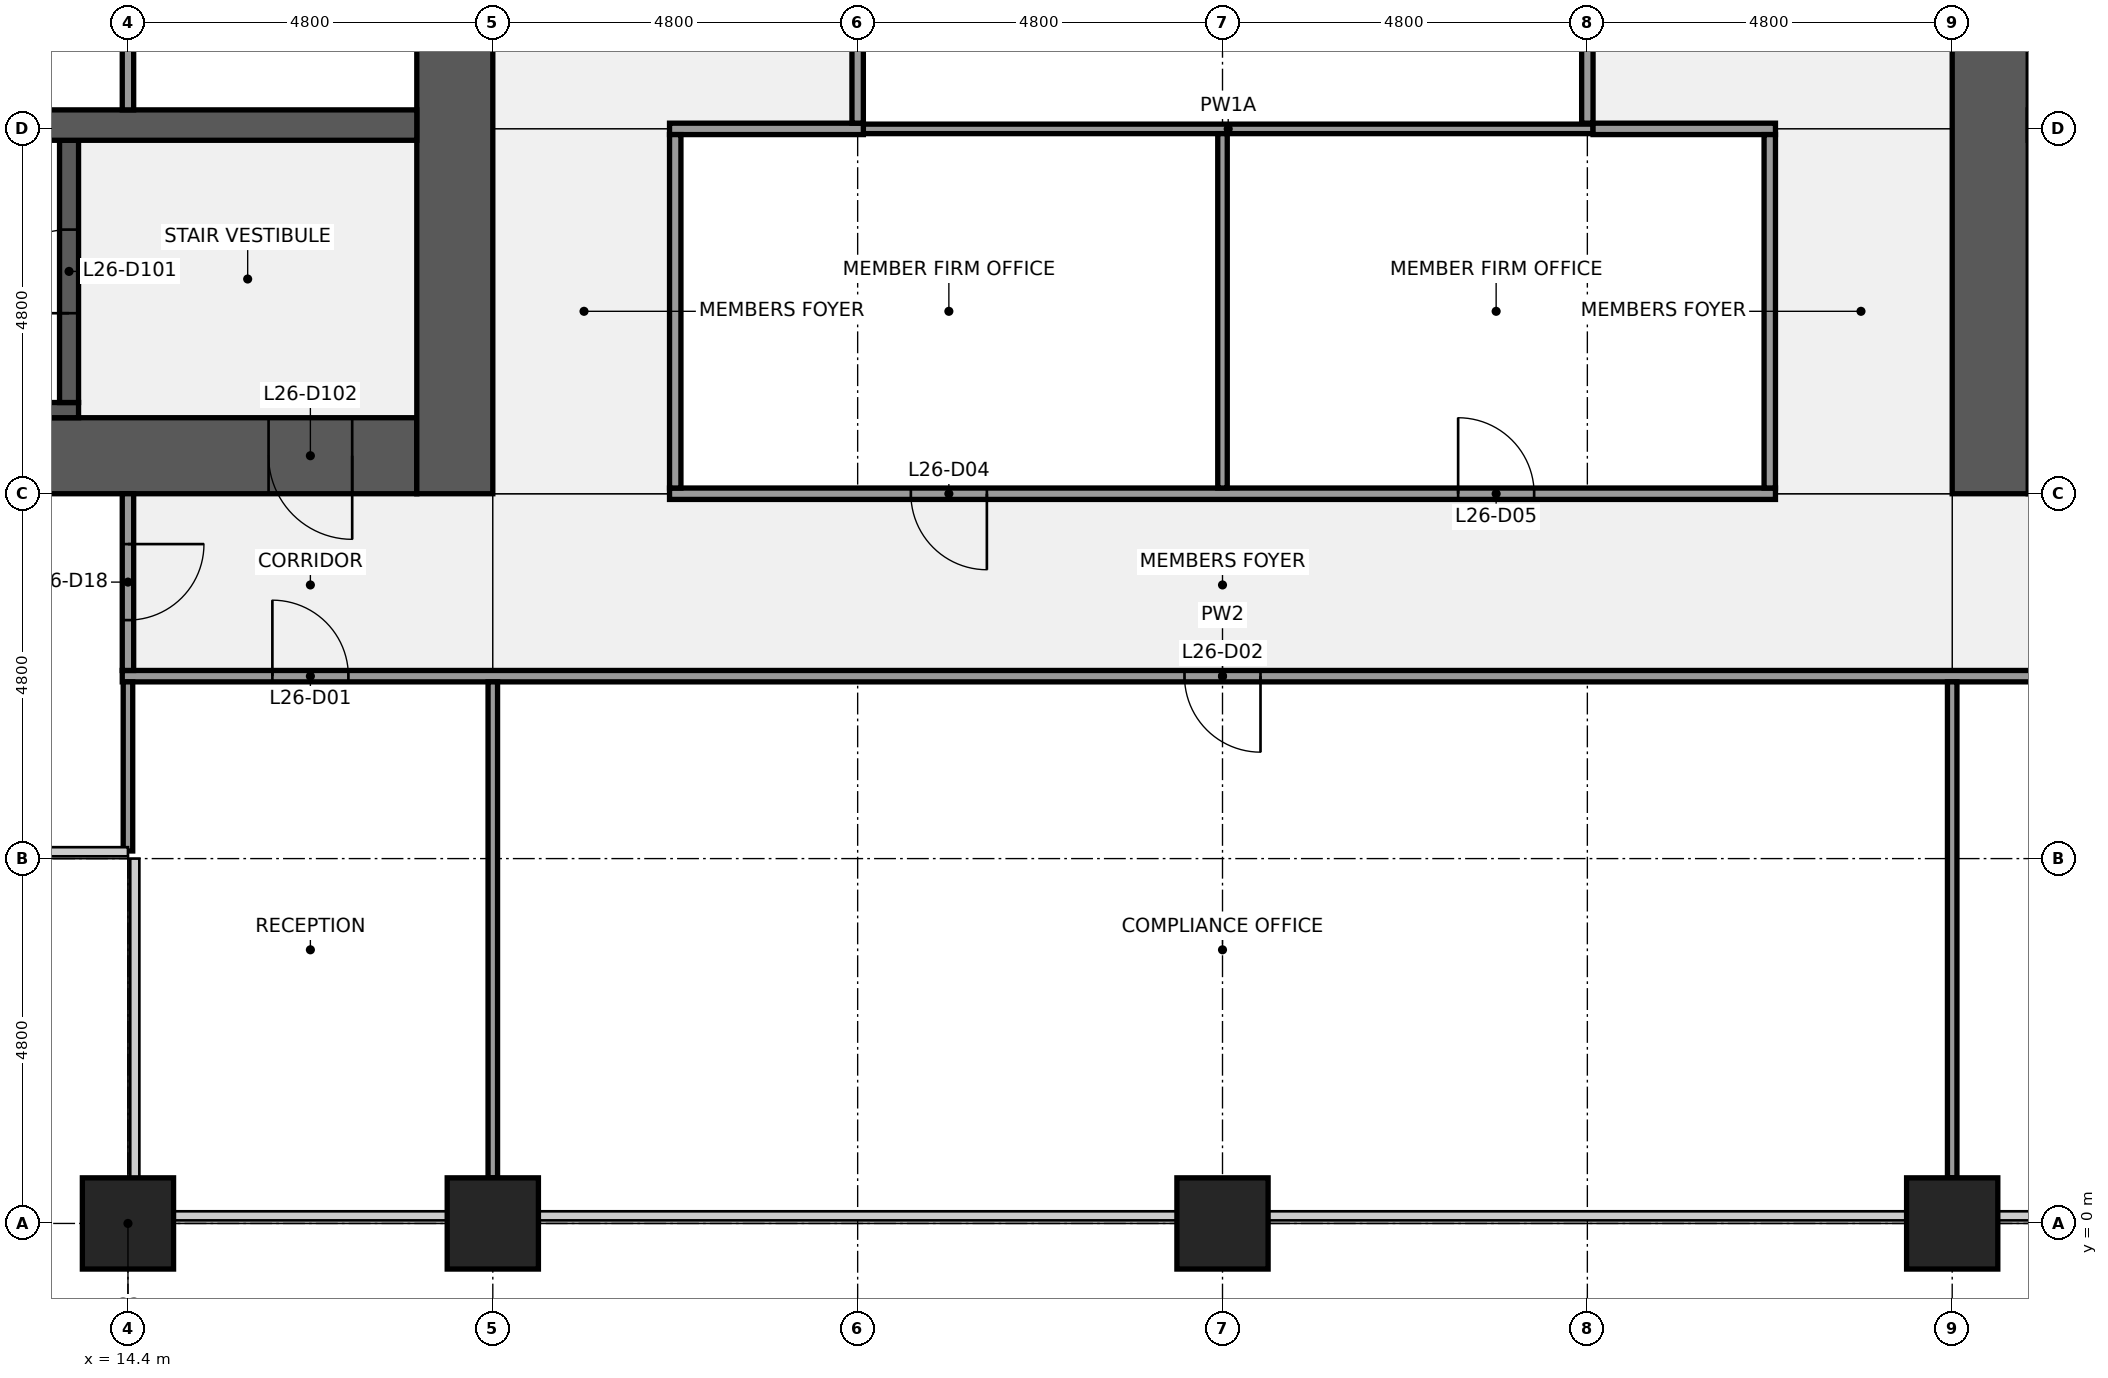
"""IFC4 building model, lengths in metres.
Left out: names, types, materials, properties, quantities, classifications, styles, units other than length and angle.
Written with IfcOpenShell. Run it as: python <this file> out.ifc"""

import sys

from ifc_helpers import new_model, si_unit, direction, frame, frame_2d, origin, origin_2d, place, context, subcontext, project, spatial, rectangle, extrude, element, fill, save


model = new_model("IFC4")
c1 = context("Model", 3, precision=1e-05, world=origin(), true_north=direction((0.0, 1.0)))
c2 = subcontext(c1, "Body", "Model", "MODEL_VIEW")
j1 = project(units=[si_unit("LENGTHUNIT", "METRE"), si_unit("PLANEANGLEUNIT", "RADIAN")], contexts=[c1])
p1 = place(None, origin())
s1 = spatial("IfcSite", under=j1, at=p1, CompositionType="ELEMENT")
p2 = place(p1, origin())
s2 = spatial("IfcBuilding", under=s1, at=p2, CompositionType="ELEMENT")
p3 = place(p2, frame((0.0, 0.0, 124.1)))
s3 = spatial("IfcBuildingStorey", under=s2, at=p3, CompositionType="ELEMENT", Elevation=124.1)
for number, where, z_axis, x_axis in (
    (1, (14.4, 0.0, 0.0), (0.0, 0.0, 1.0), (1.0, 0.0, 0.0)),
    (2, (19.2, 0.0, 0.0), (0.0, 0.0, 1.0), (1.0, 0.0, 0.0)),
    (3, (28.8, 0.0, 0.0), (0.0, 0.0, 1.0), (1.0, 0.0, 0.0)),
    (4, (38.4, 0.0, 0.0), (0.0, 0.0, 1.0), (1.0, 0.0, 0.0)),
):
    element("IfcColumn", number, at=place(p3, frame(where, z_axis=z_axis, x_axis=x_axis)), inside=s3, PredefinedType="COLUMN", context=c2, shape_type="SweptSolid", body=[
        extrude(rectangle(XDim=1.2, YDim=1.2, at=origin_2d()), origin(), (0.0, 0.0, 1.0), 4.0),
    ])
p4 = place(p3, frame((18.2, 10.1, 0.0), z_axis=(0.0, 0.0, 1.0), x_axis=(-1.0, 0.0, 0.0)))
e5 = element("IfcWall", 5, at=p4, inside=s3, PredefinedType="SHEAR", context=c2, shape_type="SweptSolid", body=[
    extrude(rectangle(XDim=8.6, YDim=1.0, at=frame_2d((4.3, 0.0))), origin(), (0.0, 0.0, 1.0), 3.84),
])
p5 = place(p4, frame((0.85, 0.0, 0.0)))
e6 = element("IfcOpeningElement", 6, at=p5, cuts=e5, PredefinedType="OPENING", context=c2, shape_type="SweptSolid", body=[
    extrude(rectangle(XDim=1.1, YDim=2.1, at=frame_2d((0.55, 1.05))), frame((0.0, 0.51, 0.0), z_axis=(0.0, -1.0, 0.0), x_axis=(1.0, 0.0, 0.0)), (0.0, 0.0, 1.0), 1.02),
])
p6 = place(p3, frame((18.7, 38.4, 0.0), z_axis=(0.0, 0.0, 1.0), x_axis=(0.0, -1.0, 0.0)))
e7 = element("IfcWall", 7, at=p6, inside=s3, PredefinedType="SHEAR", context=c2, shape_type="SweptSolid", body=[
    extrude(rectangle(XDim=28.8, YDim=1.0, at=frame_2d((14.4, 0.0))), origin(), (0.0, 0.0, 1.0), 3.84),
])
p7 = place(p6, frame((18.3, 0.0, 0.0)))
e8 = element("IfcOpeningElement", 8, at=p7, cuts=e7, PredefinedType="OPENING", context=c2, shape_type="SweptSolid", body=[
    extrude(rectangle(XDim=1.8, YDim=2.1, at=frame_2d((0.9, 1.05))), frame((0.0, 0.51, 0.0), z_axis=(0.0, -1.0, 0.0), x_axis=(1.0, 0.0, 0.0)), (0.0, 0.0, 1.0), 1.02),
])
p8 = place(p6, frame((8.7, 0.0, 0.0)))
e9 = element("IfcOpeningElement", 9, at=p8, cuts=e7, PredefinedType="OPENING", context=c2, shape_type="SweptSolid", body=[
    extrude(rectangle(XDim=1.8, YDim=2.1, at=frame_2d((0.9, 1.05))), frame((0.0, 0.51, 0.0), z_axis=(0.0, -1.0, 0.0), x_axis=(1.0, 0.0, 0.0)), (0.0, 0.0, 1.0), 1.02),
])
p9 = place(p3, frame((9.6, 10.7, 0.0), z_axis=(0.0, 0.0, 1.0), x_axis=(1.0, 0.0, 0.0)))
e10 = element("IfcWall", 10, at=p9, inside=s3, PredefinedType="SHEAR", context=c2, shape_type="SweptSolid", body=[
    extrude(rectangle(XDim=4.15, YDim=0.2, at=frame_2d((2.075, 0.0))), origin(), (0.0, 0.0, 1.0), 3.84),
])
p10 = place(p3, frame((13.625, 10.8, 0.0), z_axis=(0.0, 0.0, 1.0), x_axis=(0.0, 1.0, 0.0)))
e11 = element("IfcWall", 11, at=p10, inside=s3, PredefinedType="SHEAR", context=c2, shape_type="SweptSolid", body=[
    extrude(rectangle(XDim=3.45, YDim=0.25, at=frame_2d((1.725, 0.0))), origin(), (0.0, 0.0, 1.0), 3.84),
])
p11 = place(p10, frame((1.175, 0.0, 0.0)))
e12 = element("IfcOpeningElement", 12, at=p11, cuts=e11, PredefinedType="OPENING", context=c2, shape_type="SweptSolid", body=[
    extrude(rectangle(XDim=1.1, YDim=2.1, at=frame_2d((0.55, 1.05))), frame((0.0, 0.135, 0.0), z_axis=(0.0, -1.0, 0.0), x_axis=(1.0, 0.0, 0.0)), (0.0, 0.0, 1.0), 0.27),
])
p12 = place(p3, frame((1.0, 14.45, 0.0), z_axis=(0.0, 0.0, 1.0), x_axis=(1.0, 0.0, 0.0)))
e13 = element("IfcWall", 13, at=p12, inside=s3, PredefinedType="SHEAR", context=c2, shape_type="SweptSolid", body=[
    extrude(rectangle(XDim=17.2, YDim=0.4, at=frame_2d((8.6, 0.0))), origin(), (0.0, 0.0, 1.0), 3.84),
])
p13 = place(p3, frame((14.4, 14.65, 0.0), z_axis=(0.0, 0.0, 1.0), x_axis=(0.0, 1.0, 0.0)))
e14 = element("IfcWall", 14, at=p13, inside=s3, PredefinedType="PARTITIONING", context=c2, shape_type="SweptSolid", body=[
    extrude(rectangle(XDim=2.6, YDim=0.15, at=frame_2d((1.3, 0.0))), origin(), (0.0, 0.0, 1.0), 3.84),
])
p14 = place(p3, frame((38.9, 9.6, 0.0), z_axis=(0.0, 0.0, 1.0), x_axis=(0.0, 1.0, 0.0)))
e15 = element("IfcWall", 15, at=p14, inside=s3, PredefinedType="SHEAR", context=c2, shape_type="SweptSolid", body=[
    extrude(rectangle(XDim=28.8, YDim=1.0, at=frame_2d((14.4, 0.0))), origin(), (0.0, 0.0, 1.0), 3.84),
])
p15 = place(p14, frame((8.7, 0.0, 0.0)))
e16 = element("IfcOpeningElement", 16, at=p15, cuts=e15, PredefinedType="OPENING", context=c2, shape_type="SweptSolid", body=[
    extrude(rectangle(XDim=1.8, YDim=2.1, at=frame_2d((0.9, 1.05))), frame((0.0, 0.51, 0.0), z_axis=(0.0, -1.0, 0.0), x_axis=(1.0, 0.0, 0.0)), (0.0, 0.0, 1.0), 1.02),
])
p16 = place(p14, frame((18.3, 0.0, 0.0)))
e17 = element("IfcOpeningElement", 17, at=p16, cuts=e15, PredefinedType="OPENING", context=c2, shape_type="SweptSolid", body=[
    extrude(rectangle(XDim=1.8, YDim=2.1, at=frame_2d((0.9, 1.05))), frame((0.0, 0.51, 0.0), z_axis=(0.0, -1.0, 0.0), x_axis=(1.0, 0.0, 0.0)), (0.0, 0.0, 1.0), 1.02),
])
p17 = place(p3, frame((14.325, 7.2, 0.0), z_axis=(0.0, 0.0, 1.0), x_axis=(1.0, 0.0, 0.0)))
e18 = element("IfcWall", 18, at=p17, inside=s3, PredefinedType="PARTITIONING", context=c2, shape_type="SweptSolid", body=[
    extrude(rectangle(XDim=28.95, YDim=0.15, at=frame_2d((14.475, 0.0))), origin(), (0.0, 0.0, 1.0), 2.849),
])
p18 = place(p17, frame((1.975, 0.0, 0.0)))
e19 = element("IfcOpeningElement", 19, at=p18, cuts=e18, PredefinedType="OPENING", context=c2, shape_type="SweptSolid", body=[
    extrude(rectangle(XDim=1.0, YDim=2.1, at=frame_2d((0.5, 1.05))), frame((0.0, 0.085, 0.0), z_axis=(0.0, -1.0, 0.0), x_axis=(1.0, 0.0, 0.0)), (0.0, 0.0, 1.0), 0.17),
])
p19 = place(p17, frame((13.975, 0.0, 0.0)))
e20 = element("IfcOpeningElement", 20, at=p19, cuts=e18, PredefinedType="OPENING", context=c2, shape_type="SweptSolid", body=[
    extrude(rectangle(XDim=1.0, YDim=2.1, at=frame_2d((0.5, 1.05))), frame((0.0, 0.085, 0.0), z_axis=(0.0, -1.0, 0.0), x_axis=(1.0, 0.0, 0.0)), (0.0, 0.0, 1.0), 0.17),
])
p20 = place(p17, frame((25.975, 0.0, 0.0)))
e21 = element("IfcOpeningElement", 21, at=p20, cuts=e18, PredefinedType="OPENING", context=c2, shape_type="SweptSolid", body=[
    extrude(rectangle(XDim=1.0, YDim=2.1, at=frame_2d((0.5, 1.05))), frame((0.0, 0.085, 0.0), z_axis=(0.0, -1.0, 0.0), x_axis=(1.0, 0.0, 0.0)), (0.0, 0.0, 1.0), 0.17),
])
p21 = place(p3, frame((21.525, 9.6, 0.0), z_axis=(0.0, 0.0, 1.0), x_axis=(1.0, 0.0, 0.0)))
e22 = element("IfcWall", 22, at=p21, inside=s3, PredefinedType="PARTITIONING", context=c2, shape_type="SweptSolid", body=[
    extrude(rectangle(XDim=14.55, YDim=0.15, at=frame_2d((7.275, 0.0))), origin(), (0.0, 0.0, 1.0), 2.849),
])
p22 = place(p21, frame((3.175, 0.0, 0.0)))
e23 = element("IfcOpeningElement", 23, at=p22, cuts=e22, PredefinedType="OPENING", context=c2, shape_type="SweptSolid", body=[
    extrude(rectangle(XDim=1.0, YDim=2.1, at=frame_2d((0.5, 1.05))), frame((0.0, 0.085, 0.0), z_axis=(0.0, -1.0, 0.0), x_axis=(1.0, 0.0, 0.0)), (0.0, 0.0, 1.0), 0.17),
])
p23 = place(p21, frame((10.375, 0.0, 0.0)))
e24 = element("IfcOpeningElement", 24, at=p23, cuts=e22, PredefinedType="OPENING", context=c2, shape_type="SweptSolid", body=[
    extrude(rectangle(XDim=1.0, YDim=2.1, at=frame_2d((0.5, 1.05))), frame((0.0, 0.085, 0.0), z_axis=(0.0, -1.0, 0.0), x_axis=(1.0, 0.0, 0.0)), (0.0, 0.0, 1.0), 0.17),
])
p24 = place(p3, frame((24.075, 14.4, 0.0), z_axis=(0.0, 0.0, 1.0), x_axis=(1.0, 0.0, 0.0)))
e25 = element("IfcWall", 25, at=p24, inside=s3, PredefinedType="PARTITIONING", context=c2, shape_type="SweptSolid", body=[
    extrude(rectangle(XDim=9.6, YDim=0.125, at=frame_2d((4.8, 0.0))), origin(), (0.0, 0.0, 1.0), 2.849),
])
p25 = place(p3, frame((21.525, 14.4, 0.0), z_axis=(0.0, 0.0, 1.0), x_axis=(1.0, 0.0, 0.0)))
e26 = element("IfcWall", 26, at=p25, inside=s3, PredefinedType="PARTITIONING", context=c2, shape_type="SweptSolid", body=[
    extrude(rectangle(XDim=2.55, YDim=0.15, at=frame_2d((1.275, 0.0))), origin(), (0.0, 0.0, 1.0), 2.849),
])
p26 = place(p3, frame((33.675, 14.4, 0.0), z_axis=(0.0, 0.0, 1.0), x_axis=(1.0, 0.0, 0.0)))
e27 = element("IfcWall", 27, at=p26, inside=s3, PredefinedType="PARTITIONING", context=c2, shape_type="SweptSolid", body=[
    extrude(rectangle(XDim=2.4, YDim=0.15, at=frame_2d((1.2, 0.0))), origin(), (0.0, 0.0, 1.0), 2.849),
])
p27 = place(p3, frame((14.4, 4.9, 0.0), z_axis=(0.0, 0.0, 1.0), x_axis=(0.0, 1.0, 0.0)))
e28 = element("IfcWall", 28, at=p27, inside=s3, PredefinedType="PARTITIONING", context=c2, shape_type="SweptSolid", body=[
    extrude(rectangle(XDim=2.225, YDim=0.125, at=frame_2d((1.113, 0.0))), origin(), (0.0, 0.0, 1.0), 2.849),
])
p28 = place(p3, frame((14.4, 7.275, 0.0), z_axis=(0.0, 0.0, 1.0), x_axis=(0.0, 1.0, 0.0)))
e29 = element("IfcWall", 29, at=p28, inside=s3, PredefinedType="PARTITIONING", context=c2, shape_type="SweptSolid", body=[
    extrude(rectangle(XDim=2.325, YDim=0.15, at=frame_2d((1.163, 0.0))), origin(), (0.0, 0.0, 1.0), 2.849),
])
p29 = place(p28, frame((0.663, 0.0, 0.0)))
e30 = element("IfcOpeningElement", 30, at=p29, cuts=e29, PredefinedType="OPENING", context=c2, shape_type="SweptSolid", body=[
    extrude(rectangle(XDim=1.0, YDim=2.1, at=frame_2d((0.5, 1.05))), frame((0.0, 0.085, 0.0), z_axis=(0.0, -1.0, 0.0), x_axis=(1.0, 0.0, 0.0)), (0.0, 0.0, 1.0), 0.17),
])
p30 = place(p3, frame((19.2, 0.6, 0.0), z_axis=(0.0, 0.0, 1.0), x_axis=(0.0, 1.0, 0.0)))
e31 = element("IfcWall", 31, at=p30, inside=s3, PredefinedType="PARTITIONING", context=c2, shape_type="SweptSolid", body=[
    extrude(rectangle(XDim=6.525, YDim=0.125, at=frame_2d((3.262, 0.0))), origin(), (0.0, 0.0, 1.0), 2.849),
])
p31 = place(p3, frame((21.6, 9.675, 0.0), z_axis=(0.0, 0.0, 1.0), x_axis=(0.0, 1.0, 0.0)))
e32 = element("IfcWall", 32, at=p31, inside=s3, PredefinedType="PARTITIONING", context=c2, shape_type="SweptSolid", body=[
    extrude(rectangle(XDim=4.65, YDim=0.15, at=frame_2d((2.325, 0.0))), origin(), (0.0, 0.0, 1.0), 2.849),
])
p32 = place(p3, frame((24.0, 14.475, 0.0), z_axis=(0.0, 0.0, 1.0), x_axis=(0.0, 1.0, 0.0)))
e33 = element("IfcWall", 33, at=p32, inside=s3, PredefinedType="PARTITIONING", context=c2, shape_type="SweptSolid", body=[
    extrude(rectangle(XDim=8.25, YDim=0.15, at=frame_2d((4.125, 0.0))), origin(), (0.0, 0.0, 1.0), 2.849),
])
p33 = place(p3, frame((28.8, 9.675, 0.0), z_axis=(0.0, 0.0, 1.0), x_axis=(0.0, 1.0, 0.0)))
e34 = element("IfcWall", 34, at=p33, inside=s3, PredefinedType="PARTITIONING", context=c2, shape_type="SweptSolid", body=[
    extrude(rectangle(XDim=4.662, YDim=0.125, at=frame_2d((2.331, 0.0))), origin(), (0.0, 0.0, 1.0), 2.849),
])
p34 = place(p3, frame((33.6, 14.475, 0.0), z_axis=(0.0, 0.0, 1.0), x_axis=(0.0, 1.0, 0.0)))
e35 = element("IfcWall", 35, at=p34, inside=s3, PredefinedType="PARTITIONING", context=c2, shape_type="SweptSolid", body=[
    extrude(rectangle(XDim=8.25, YDim=0.15, at=frame_2d((4.125, 0.0))), origin(), (0.0, 0.0, 1.0), 2.849),
])
p35 = place(p3, frame((36.0, 9.675, 0.0), z_axis=(0.0, 0.0, 1.0), x_axis=(0.0, 1.0, 0.0)))
e36 = element("IfcWall", 36, at=p35, inside=s3, PredefinedType="PARTITIONING", context=c2, shape_type="SweptSolid", body=[
    extrude(rectangle(XDim=4.65, YDim=0.15, at=frame_2d((2.325, 0.0))), origin(), (0.0, 0.0, 1.0), 2.849),
])
p36 = place(p3, frame((38.4, 0.6, 0.0), z_axis=(0.0, 0.0, 1.0), x_axis=(0.0, 1.0, 0.0)))
e37 = element("IfcWall", 37, at=p36, inside=s3, PredefinedType="PARTITIONING", context=c2, shape_type="SweptSolid", body=[
    extrude(rectangle(XDim=6.525, YDim=0.125, at=frame_2d((3.262, 0.0))), origin(), (0.0, 0.0, 1.0), 2.849),
])
for number, where, z_axis, x_axis in (
    (38, (14.4, -1.05, 0.0), (0.0, 0.0, 1.0), (1.0, 0.0, 0.0)),
    (39, (19.2, -1.05, 0.0), (0.0, 0.0, 1.0), (1.0, 0.0, 0.0)),
    (40, (38.4, -1.05, 0.0), (0.0, 0.0, 1.0), (1.0, 0.0, 0.0)),
):
    element("IfcColumn", number, at=place(p3, frame(where, z_axis=z_axis, x_axis=x_axis)), inside=s3, PredefinedType="PILASTER", context=c2, shape_type="SweptSolid", body=[
        extrude(rectangle(XDim=3.6, YDim=0.9, at=origin_2d()), origin(), (0.0, 0.0, 1.0), 4.0),
    ])
p37 = place(p11, origin())
e41 = element("IfcDoor", 41, at=p37, inside=s3, OperationType="SINGLE_SWING_LEFT", PredefinedType="DOOR", context=c2, shape_type="SweptSolid", body=[
    extrude(rectangle(XDim=1.1, YDim=2.1, at=frame_2d((0.55, 1.05))), frame((0.0, 0.025, 0.0), z_axis=(0.0, -1.0, 0.0), x_axis=(1.0, 0.0, 0.0)), (0.0, 0.0, 1.0), 0.05),
])
fill(e12, e41)
p38 = place(p5, origin())
e42 = element("IfcDoor", 42, at=p38, inside=s3, OperationType="SINGLE_SWING_LEFT", PredefinedType="DOOR", context=c2, shape_type="SweptSolid", body=[
    extrude(rectangle(XDim=1.1, YDim=2.1, at=frame_2d((0.55, 1.05))), frame((0.0, 0.025, 0.0), z_axis=(0.0, -1.0, 0.0), x_axis=(1.0, 0.0, 0.0)), (0.0, 0.0, 1.0), 0.05),
])
fill(e6, e42)
p39 = place(p18, origin())
e43 = element("IfcDoor", 43, at=p39, inside=s3, OperationType="SINGLE_SWING_LEFT", PredefinedType="DOOR", context=c2, shape_type="SweptSolid", body=[
    extrude(rectangle(XDim=1.0, YDim=2.1, at=frame_2d((0.5, 1.05))), frame((0.0, 0.025, 0.0), z_axis=(0.0, -1.0, 0.0), x_axis=(1.0, 0.0, 0.0)), (0.0, 0.0, 1.0), 0.05),
])
fill(e19, e43)
p40 = place(p19, origin())
e44 = element("IfcDoor", 44, at=p40, inside=s3, OperationType="SINGLE_SWING_RIGHT", PredefinedType="DOOR", context=c2, shape_type="SweptSolid", body=[
    extrude(rectangle(XDim=1.0, YDim=2.1, at=frame_2d((0.5, 1.05))), frame((0.0, 0.025, 0.0), z_axis=(0.0, -1.0, 0.0), x_axis=(1.0, 0.0, 0.0)), (0.0, 0.0, 1.0), 0.05),
])
fill(e20, e44)
p41 = place(p22, origin())
e45 = element("IfcDoor", 45, at=p41, inside=s3, OperationType="SINGLE_SWING_RIGHT", PredefinedType="DOOR", context=c2, shape_type="SweptSolid", body=[
    extrude(rectangle(XDim=1.0, YDim=2.1, at=frame_2d((0.5, 1.05))), frame((0.0, 0.025, 0.0), z_axis=(0.0, -1.0, 0.0), x_axis=(1.0, 0.0, 0.0)), (0.0, 0.0, 1.0), 0.05),
])
fill(e23, e45)
p42 = place(p23, origin())
e46 = element("IfcDoor", 46, at=p42, inside=s3, OperationType="SINGLE_SWING_LEFT", PredefinedType="DOOR", context=c2, shape_type="SweptSolid", body=[
    extrude(rectangle(XDim=1.0, YDim=2.1, at=frame_2d((0.5, 1.05))), frame((0.0, 0.025, 0.0), z_axis=(0.0, -1.0, 0.0), x_axis=(1.0, 0.0, 0.0)), (0.0, 0.0, 1.0), 0.05),
])
fill(e24, e46)
p43 = place(p29, origin())
e47 = element("IfcDoor", 47, at=p43, inside=s3, OperationType="SINGLE_SWING_RIGHT", PredefinedType="DOOR", context=c2, shape_type="SweptSolid", body=[
    extrude(rectangle(XDim=1.0, YDim=2.1, at=frame_2d((0.5, 1.05))), frame((0.0, 0.025, 0.0), z_axis=(0.0, -1.0, 0.0), x_axis=(1.0, 0.0, 0.0)), (0.0, 0.0, 1.0), 0.05),
])
fill(e30, e47)
save(model, sys.argv[1])
